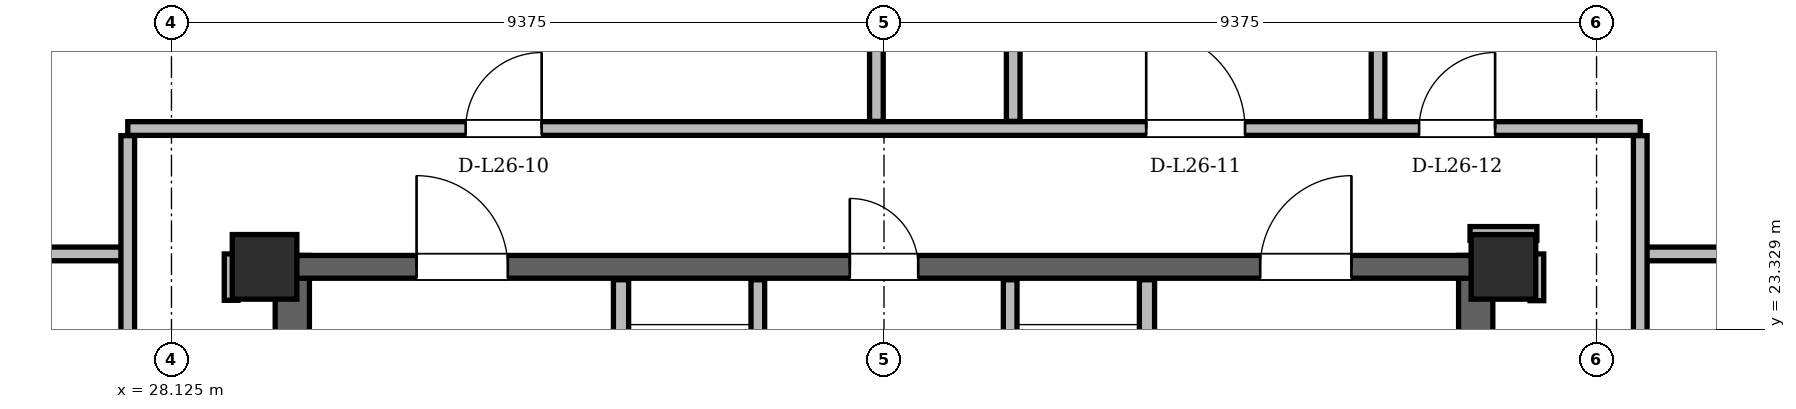
"""IFC4 building model, lengths in metres.
Left out: names, types, materials, properties, quantities, classifications, styles, units other than length and angle.
Written with IfcOpenShell. Run it as: python <this file> out.ifc"""

import sys

from ifc_helpers import new_model, si_unit, direction, frame, frame_2d, origin, origin_2d, place, context, subcontext, project, spatial, rectangle, hollow_rectangle, extrude, element, fill, save


model = new_model("IFC4")
c1 = context("Model", 3, precision=1e-05, world=origin(), true_north=direction((0.0, 1.0)))
c2 = subcontext(c1, "Body", "Model", "MODEL_VIEW")
j1 = project(units=[si_unit("LENGTHUNIT", "METRE"), si_unit("PLANEANGLEUNIT", "RADIAN")], contexts=[c1])
p1 = place(None, origin())
s1 = spatial("IfcSite", under=j1, at=p1, CompositionType="ELEMENT")
p2 = place(p1, origin())
s2 = spatial("IfcBuilding", under=s1, at=p2, CompositionType="ELEMENT")
p3 = place(p2, frame((0.0, 0.0, 100.5)))
s3 = spatial("IfcBuildingStorey", under=s2, at=p3, CompositionType="ELEMENT", Elevation=100.5)
for number, where, z_axis, x_axis in (
    (1, (45.65, 24.15, 0.0), (0.0, 0.0, 1.0), (1.0, 0.0, 0.0)),
    (2, (29.35, 24.15, 0.0), (0.0, 0.0, 1.0), (1.0, 0.0, 0.0)),
):
    element("IfcColumn", number, at=place(p3, frame(where, z_axis=z_axis, x_axis=x_axis)), inside=s3, PredefinedType="COLUMN", context=c2, shape_type="SweptSolid", body=[
        extrude(hollow_rectangle(XDim=0.85, YDim=0.85, WallThickness=0.07, at=origin_2d()), origin(), (0.0, 0.0, 1.0), 3.6),
    ])
for number, where, z_axis, x_axis in (
    (3, (29.715, 11.0, 0.0), (0.0, 0.0, 1.0), (0.0, 1.0, 0.0)),
    (4, (45.285, 11.0, 0.0), (0.0, 0.0, 1.0), (0.0, 1.0, 0.0)),
):
    element("IfcWall", number, at=place(p3, frame(where, z_axis=z_axis, x_axis=x_axis)), inside=s3, PredefinedType="SHEAR", context=c2, shape_type="SweptSolid", body=[
        extrude(rectangle(XDim=13.3, YDim=0.45, at=frame_2d((6.65, 0.0))), origin(), (0.0, 0.0, 1.0), 3.36),
    ])
p4 = place(p3, frame((29.65, 24.15, 0.0), z_axis=(0.0, 0.0, 1.0), x_axis=(1.0, 0.0, 0.0)))
e5 = element("IfcWall", 5, at=p4, inside=s3, PredefinedType="SHEAR", context=c2, shape_type="SweptSolid", body=[
    extrude(rectangle(XDim=15.7, YDim=0.3, at=frame_2d((7.85, 0.0))), origin(), (0.0, 0.0, 1.0), 3.36),
])
p5 = place(p4, frame((1.7, 0.0, 0.0)))
e6 = element("IfcOpeningElement", 6, at=p5, cuts=e5, PredefinedType="OPENING", context=c2, shape_type="SweptSolid", body=[
    extrude(rectangle(XDim=1.2, YDim=2.2, at=frame_2d((0.6, 1.1))), frame((0.0, 0.15, 0.0), z_axis=(0.0, -1.0, 0.0), x_axis=(1.0, 0.0, 0.0)), (0.0, 0.0, 1.0), 0.3),
])
p6 = place(p4, frame((12.8, 0.0, 0.0)))
e7 = element("IfcOpeningElement", 7, at=p6, cuts=e5, PredefinedType="OPENING", context=c2, shape_type="SweptSolid", body=[
    extrude(rectangle(XDim=1.2, YDim=2.2, at=frame_2d((0.6, 1.1))), frame((0.0, 0.15, 0.0), z_axis=(0.0, -1.0, 0.0), x_axis=(1.0, 0.0, 0.0)), (0.0, 0.0, 1.0), 0.3),
])
p7 = place(p4, frame((7.4, 0.0, 0.0)))
e8 = element("IfcOpeningElement", 8, at=p7, cuts=e5, PredefinedType="OPENING", context=c2, shape_type="SweptSolid", body=[
    extrude(rectangle(XDim=0.9, YDim=2.05, at=frame_2d((0.45, 1.025))), frame((0.0, 0.15, 0.0), z_axis=(0.0, -1.0, 0.0), x_axis=(1.0, 0.0, 0.0)), (0.0, 0.0, 1.0), 0.3),
])
p8 = place(p3, frame((60.69, 13.561, 0.0), z_axis=(0.0, 0.0, 1.0), x_axis=(-0.500002056916, 0.86602421622, 0.0)))
e9 = element("IfcWall", 9, at=p8, inside=s3, PredefinedType="SOLIDWALL", context=c2, shape_type="SweptSolid", body=[
    extrude(rectangle(XDim=34.516, YDim=0.34, at=frame_2d((17.258, 0.0))), origin(), (0.0, 0.0, 1.0), 2.578),
])
p9 = place(p8, frame((8.034, 0.0, 0.0)))
e10 = element("IfcOpeningElement", 10, at=p9, cuts=e9, PredefinedType="OPENING", context=c2, shape_type="SweptSolid", body=[
    extrude(rectangle(XDim=1.5, YDim=2.2, at=frame_2d((0.75, 1.1))), frame((0.0, 0.17, 0.0), z_axis=(0.0, -1.0, 0.0), x_axis=(1.0, 0.0, 0.0)), (0.0, 0.0, 1.0), 0.34),
])
p10 = place(p8, frame((26.647, 0.0, 0.0)))
e11 = element("IfcOpeningElement", 11, at=p10, cuts=e9, PredefinedType="OPENING", context=c2, shape_type="SweptSolid", body=[
    extrude(rectangle(XDim=1.5, YDim=2.2, at=frame_2d((0.75, 1.1))), frame((0.0, 0.17, 0.0), z_axis=(0.0, -1.0, 0.0), x_axis=(1.0, 0.0, 0.0)), (0.0, 0.0, 1.0), 0.34),
])
p11 = place(p8, frame((1.477, 0.0, 0.85)))
e12 = element("IfcOpeningElement", 12, at=p11, cuts=e9, PredefinedType="OPENING", context=c2, shape_type="SweptSolid", body=[
    extrude(rectangle(XDim=2.5, YDim=1.618, at=frame_2d((1.25, 0.809))), frame((0.0, 0.17, 0.0), z_axis=(0.0, -1.0, 0.0), x_axis=(1.0, 0.0, 0.0)), (0.0, 0.0, 1.0), 0.34),
])
p12 = place(p8, frame((16.107, 0.0, 0.85)))
e13 = element("IfcOpeningElement", 13, at=p12, cuts=e9, PredefinedType="OPENING", context=c2, shape_type="SweptSolid", body=[
    extrude(rectangle(XDim=1.4, YDim=1.6, at=frame_2d((0.7, 0.8))), frame((0.0, 0.17, 0.0), z_axis=(0.0, -1.0, 0.0), x_axis=(1.0, 0.0, 0.0)), (0.0, 0.0, 1.0), 0.34),
])
p13 = place(p8, frame((30.693, 0.0, 0.85)))
e14 = element("IfcOpeningElement", 14, at=p13, cuts=e9, PredefinedType="OPENING", context=c2, shape_type="SweptSolid", body=[
    extrude(rectangle(XDim=2.5, YDim=1.618, at=frame_2d((1.25, 0.809))), frame((0.0, 0.17, 0.0), z_axis=(0.0, -1.0, 0.0), x_axis=(1.0, 0.0, 0.0)), (0.0, 0.0, 1.0), 0.34),
])
p14 = place(p3, frame((31.568, 43.453, 0.0), z_axis=(0.0, 0.0, 1.0), x_axis=(-0.500002056916, -0.86602421622, 0.0)))
e15 = element("IfcWall", 15, at=p14, inside=s3, PredefinedType="SOLIDWALL", context=c2, shape_type="SweptSolid", body=[
    extrude(rectangle(XDim=34.516, YDim=0.34, at=frame_2d((17.258, 0.0))), origin(), (0.0, 0.0, 1.0), 2.578),
])
p15 = place(p14, frame((8.034, 0.0, 0.0)))
e16 = element("IfcOpeningElement", 16, at=p15, cuts=e15, PredefinedType="OPENING", context=c2, shape_type="SweptSolid", body=[
    extrude(rectangle(XDim=1.5, YDim=2.2, at=frame_2d((0.75, 1.1))), frame((0.0, 0.17, 0.0), z_axis=(0.0, -1.0, 0.0), x_axis=(1.0, 0.0, 0.0)), (0.0, 0.0, 1.0), 0.34),
])
p16 = place(p14, frame((26.647, 0.0, 0.0)))
e17 = element("IfcOpeningElement", 17, at=p16, cuts=e15, PredefinedType="OPENING", context=c2, shape_type="SweptSolid", body=[
    extrude(rectangle(XDim=1.5, YDim=2.2, at=frame_2d((0.75, 1.1))), frame((0.0, 0.17, 0.0), z_axis=(0.0, -1.0, 0.0), x_axis=(1.0, 0.0, 0.0)), (0.0, 0.0, 1.0), 0.34),
])
p17 = place(p14, frame((31.672, 0.0, 0.85)))
e18 = element("IfcOpeningElement", 18, at=p17, cuts=e15, PredefinedType="OPENING", context=c2, shape_type="SweptSolid", body=[
    extrude(rectangle(XDim=1.6, YDim=1.618, at=frame_2d((0.8, 0.809))), frame((0.0, 0.17, 0.0), z_axis=(0.0, -1.0, 0.0), x_axis=(1.0, 0.0, 0.0)), (0.0, 0.0, 1.0), 0.34),
])
p18 = place(p14, frame((11.262, 0.0, 0.85)))
e19 = element("IfcOpeningElement", 19, at=p18, cuts=e15, PredefinedType="OPENING", context=c2, shape_type="SweptSolid", body=[
    extrude(rectangle(XDim=1.8, YDim=1.618, at=frame_2d((0.9, 0.809))), frame((0.0, 0.17, 0.0), z_axis=(0.0, -1.0, 0.0), x_axis=(1.0, 0.0, 0.0)), (0.0, 0.0, 1.0), 0.34),
])
p19 = place(p14, frame((18.602, 0.0, 0.85)))
e20 = element("IfcOpeningElement", 20, at=p19, cuts=e15, PredefinedType="OPENING", context=c2, shape_type="SweptSolid", body=[
    extrude(rectangle(XDim=1.2, YDim=1.48, at=frame_2d((0.6, 0.74))), frame((0.0, 0.17, 0.0), z_axis=(0.0, -1.0, 0.0), x_axis=(1.0, 0.0, 0.0)), (0.0, 0.0, 1.0), 0.34),
])
p20 = place(p14, frame((1.763, 0.0, 0.85)))
e21 = element("IfcOpeningElement", 21, at=p20, cuts=e15, PredefinedType="OPENING", context=c2, shape_type="SweptSolid", body=[
    extrude(rectangle(XDim=1.6, YDim=1.618, at=frame_2d((0.8, 0.809))), frame((0.0, 0.17, 0.0), z_axis=(0.0, -1.0, 0.0), x_axis=(1.0, 0.0, 0.0)), (0.0, 0.0, 1.0), 0.34),
])
p21 = place(p3, frame((34.04, 19.48, 0.0), z_axis=(0.0, 0.0, 1.0), x_axis=(0.0, 1.0, 0.0)))
e22 = element("IfcWall", 22, at=p21, inside=s3, PredefinedType="PARTITIONING", context=c2, shape_type="SweptSolid", body=[
    extrude(rectangle(XDim=4.5, YDim=0.2, at=frame_2d((2.25, 0.0))), origin(), (0.0, 0.0, 1.0), 2.4),
])
p22 = place(p21, frame((2.12, 0.0, 0.0)))
e23 = element("IfcOpeningElement", 23, at=p22, cuts=e22, PredefinedType="OPENING", context=c2, shape_type="SweptSolid", body=[
    extrude(rectangle(XDim=1.1, YDim=2.2, at=frame_2d((0.55, 1.1))), frame((0.0, 0.1, 0.0), z_axis=(0.0, -1.0, 0.0), x_axis=(1.0, 0.0, 0.0)), (0.0, 0.0, 1.0), 0.2),
])
p23 = place(p3, frame((35.84, 20.96, 0.0), z_axis=(0.0, 0.0, 1.0), x_axis=(0.0, 1.0, 0.0)))
e24 = element("IfcWall", 24, at=p23, inside=s3, PredefinedType="PARTITIONING", context=c2, shape_type="SweptSolid", body=[
    extrude(rectangle(XDim=3.02, YDim=0.18, at=frame_2d((1.51, 0.0))), origin(), (0.0, 0.0, 1.0), 2.4),
])
p24 = place(p3, frame((40.96, 19.48, 0.0), z_axis=(0.0, 0.0, 1.0), x_axis=(0.0, 1.0, 0.0)))
e25 = element("IfcWall", 25, at=p24, inside=s3, PredefinedType="PARTITIONING", context=c2, shape_type="SweptSolid", body=[
    extrude(rectangle(XDim=4.5, YDim=0.2, at=frame_2d((2.25, 0.0))), origin(), (0.0, 0.0, 1.0), 2.4),
])
p25 = place(p24, frame((2.12, 0.0, 0.0)))
e26 = element("IfcOpeningElement", 26, at=p25, cuts=e25, PredefinedType="OPENING", context=c2, shape_type="SweptSolid", body=[
    extrude(rectangle(XDim=1.1, YDim=2.2, at=frame_2d((0.55, 1.1))), frame((0.0, 0.1, 0.0), z_axis=(0.0, -1.0, 0.0), x_axis=(1.0, 0.0, 0.0)), (0.0, 0.0, 1.0), 0.2),
])
p26 = place(p3, frame((39.16, 20.96, 0.0), z_axis=(0.0, 0.0, 1.0), x_axis=(0.0, 1.0, 0.0)))
e27 = element("IfcWall", 27, at=p26, inside=s3, PredefinedType="PARTITIONING", context=c2, shape_type="SweptSolid", body=[
    extrude(rectangle(XDim=3.02, YDim=0.18, at=frame_2d((1.51, 0.0))), origin(), (0.0, 0.0, 1.0), 2.4),
])
p27 = place(p3, frame((20.723, 24.32, 0.0), z_axis=(0.0, 0.0, 1.0), x_axis=(1.0, 0.0, 0.0)))
e28 = element("IfcWall", 28, at=p27, inside=s3, PredefinedType="PARTITIONING", context=c2, shape_type="SweptSolid", body=[
    extrude(rectangle(XDim=6.887, YDim=0.18, at=frame_2d((3.444, 0.0))), origin(), (0.0, 0.0, 1.0), 3.36),
])
p28 = place(p3, frame((47.45, 24.32, 0.0), z_axis=(0.0, 0.0, 1.0), x_axis=(1.0, 0.0, 0.0)))
e29 = element("IfcWall", 29, at=p28, inside=s3, PredefinedType="PARTITIONING", context=c2, shape_type="SweptSolid", body=[
    extrude(rectangle(XDim=6.827, YDim=0.18, at=frame_2d((3.414, 0.0))), origin(), (0.0, 0.0, 1.0), 3.36),
])
p29 = place(p3, frame((45.21, 24.59, 0.0), z_axis=(0.0, 0.0, 1.0), x_axis=(1.0, 0.0, 0.0)))
e30 = element("IfcWall", 30, at=p29, inside=s3, PredefinedType="PARTITIONING", context=c2, shape_type="SweptSolid", body=[
    extrude(rectangle(XDim=0.88, YDim=0.18, at=frame_2d((0.44, 0.0))), origin(), (0.0, 0.0, 1.0), 2.814),
])
p30 = place(p3, frame((27.55, 25.97, 0.0), z_axis=(0.0, 0.0, 1.0), x_axis=(1.0, 0.0, 0.0)))
e31 = element("IfcWall", 31, at=p30, inside=s3, PredefinedType="PARTITIONING", context=c2, shape_type="SweptSolid", body=[
    extrude(rectangle(XDim=19.9, YDim=0.18, at=frame_2d((9.95, 0.0))), origin(), (0.0, 0.0, 1.0), 2.814),
])
p31 = place(p30, frame((4.446, 0.0, 0.0)))
e32 = element("IfcOpeningElement", 32, at=p31, cuts=e31, PredefinedType="OPENING", context=c2, shape_type="SweptSolid", body=[
    extrude(rectangle(XDim=1.0, YDim=2.18, at=frame_2d((0.5, 1.09))), frame((0.0, 0.09, 0.0), z_axis=(0.0, -1.0, 0.0), x_axis=(1.0, 0.0, 0.0)), (0.0, 0.0, 1.0), 0.18),
])
p32 = place(p30, frame((13.4, 0.0, 0.0)))
e33 = element("IfcOpeningElement", 33, at=p32, cuts=e31, PredefinedType="OPENING", context=c2, shape_type="SweptSolid", body=[
    extrude(rectangle(XDim=1.3, YDim=2.2, at=frame_2d((0.65, 1.1))), frame((0.0, 0.09, 0.0), z_axis=(0.0, -1.0, 0.0), x_axis=(1.0, 0.0, 0.0)), (0.0, 0.0, 1.0), 0.18),
])
p33 = place(p30, frame((16.99, 0.0, 0.0)))
e34 = element("IfcOpeningElement", 34, at=p33, cuts=e31, PredefinedType="OPENING", context=c2, shape_type="SweptSolid", body=[
    extrude(rectangle(XDim=1.0, YDim=2.18, at=frame_2d((0.5, 1.09))), frame((0.0, 0.09, 0.0), z_axis=(0.0, -1.0, 0.0), x_axis=(1.0, 0.0, 0.0)), (0.0, 0.0, 1.0), 0.18),
])
p34 = place(p3, frame((27.55, 11.044, 0.0), z_axis=(0.0, 0.0, 1.0), x_axis=(0.0, 1.0, 0.0)))
e35 = element("IfcWall", 35, at=p34, inside=s3, PredefinedType="PARTITIONING", context=c2, shape_type="SweptSolid", body=[
    extrude(rectangle(XDim=14.832, YDim=0.18, at=frame_2d((7.416, 0.0))), origin(), (0.0, 0.0, 1.0), 2.814),
])
p35 = place(p34, frame((9.795, 0.0, 0.0)))
e36 = element("IfcOpeningElement", 36, at=p35, cuts=e35, PredefinedType="OPENING", context=c2, shape_type="SweptSolid", body=[
    extrude(rectangle(XDim=1.0, YDim=2.18, at=frame_2d((0.5, 1.09))), frame((0.0, 0.09, 0.0), z_axis=(0.0, -1.0, 0.0), x_axis=(1.0, 0.0, 0.0)), (0.0, 0.0, 1.0), 0.18),
])
p36 = place(p3, frame((28.91, 23.71, 0.0), z_axis=(0.0, 0.0, 1.0), x_axis=(0.0, 1.0, 0.0)))
e37 = element("IfcWall", 37, at=p36, inside=s3, PredefinedType="PARTITIONING", context=c2, shape_type="SweptSolid", body=[
    extrude(rectangle(XDim=0.61, YDim=0.18, at=frame_2d((0.305, 0.0))), origin(), (0.0, 0.0, 1.0), 3.36),
])
p37 = place(p3, frame((37.4, 26.064, 0.0), z_axis=(0.0, 0.0, 1.0), x_axis=(0.0, 1.0, 0.0)))
e38 = element("IfcWall", 38, at=p37, inside=s3, PredefinedType="PARTITIONING", context=c2, shape_type="SweptSolid", body=[
    extrude(rectangle(XDim=17.215, YDim=0.18, at=frame_2d((8.607, 0.0))), origin(), (0.0, 0.0, 1.0), 3.36),
])
p38 = place(p3, frame((39.2, 26.064, 0.0), z_axis=(0.0, 0.0, 1.0), x_axis=(0.0, 1.0, 0.0)))
e39 = element("IfcWall", 39, at=p38, inside=s3, PredefinedType="PARTITIONING", context=c2, shape_type="SweptSolid", body=[
    extrude(rectangle(XDim=4.312, YDim=0.18, at=frame_2d((2.156, 0.0))), origin(), (0.0, 0.0, 1.0), 3.36),
])
p39 = place(p3, frame((44.0, 26.064, 0.0), z_axis=(0.0, 0.0, 1.0), x_axis=(0.0, 1.0, 0.0)))
e40 = element("IfcWall", 40, at=p39, inside=s3, PredefinedType="PARTITIONING", context=c2, shape_type="SweptSolid", body=[
    extrude(rectangle(XDim=4.312, YDim=0.18, at=frame_2d((2.156, 0.0))), origin(), (0.0, 0.0, 1.0), 2.946),
])
p40 = place(p3, frame((46.09, 23.705, 0.0), z_axis=(0.0, 0.0, 1.0), x_axis=(0.0, 1.0, 0.0)))
e41 = element("IfcWall", 41, at=p40, inside=s3, PredefinedType="PARTITIONING", context=c2, shape_type="SweptSolid", body=[
    extrude(rectangle(XDim=0.615, YDim=0.18, at=frame_2d((0.308, 0.0))), origin(), (0.0, 0.0, 1.0), 2.946),
])
p41 = place(p3, frame((47.45, 11.044, 0.0), z_axis=(0.0, 0.0, 1.0), x_axis=(0.0, 1.0, 0.0)))
e42 = element("IfcWall", 42, at=p41, inside=s3, PredefinedType="PARTITIONING", context=c2, shape_type="SweptSolid", body=[
    extrude(rectangle(XDim=14.832, YDim=0.18, at=frame_2d((7.416, 0.0))), origin(), (0.0, 0.0, 1.0), 2.814),
])
p42 = place(p5, origin())
e43 = element("IfcDoor", 43, at=p42, inside=s3, OperationType="SINGLE_SWING_LEFT", PredefinedType="DOOR", context=c2, shape_type="SweptSolid", body=[
    extrude(rectangle(XDim=1.2, YDim=2.2, at=frame_2d((0.6, 1.1))), frame((0.0, 0.025, 0.0), z_axis=(0.0, -1.0, 0.0), x_axis=(1.0, 0.0, 0.0)), (0.0, 0.0, 1.0), 0.05),
])
fill(e6, e43)
p43 = place(p6, origin())
e44 = element("IfcDoor", 44, at=p43, inside=s3, OperationType="SINGLE_SWING_RIGHT", PredefinedType="DOOR", context=c2, shape_type="SweptSolid", body=[
    extrude(rectangle(XDim=1.2, YDim=2.2, at=frame_2d((0.6, 1.1))), frame((0.0, 0.025, 0.0), z_axis=(0.0, -1.0, 0.0), x_axis=(1.0, 0.0, 0.0)), (0.0, 0.0, 1.0), 0.05),
])
fill(e7, e44)
p44 = place(p7, origin())
e45 = element("IfcDoor", 45, at=p44, inside=s3, OperationType="SINGLE_SWING_LEFT", PredefinedType="DOOR", context=c2, shape_type="SweptSolid", body=[
    extrude(rectangle(XDim=0.9, YDim=2.05, at=frame_2d((0.45, 1.025))), frame((0.0, 0.025, 0.0), z_axis=(0.0, -1.0, 0.0), x_axis=(1.0, 0.0, 0.0)), (0.0, 0.0, 1.0), 0.05),
])
fill(e8, e45)
p45 = place(p31, origin())
e46 = element("IfcDoor", 46, at=p45, inside=s3, OperationType="SINGLE_SWING_RIGHT", PredefinedType="DOOR", context=c2, shape_type="SweptSolid", body=[
    extrude(rectangle(XDim=1.0, YDim=2.18, at=frame_2d((0.5, 1.09))), frame((0.0, 0.025, 0.0), z_axis=(0.0, -1.0, 0.0), x_axis=(1.0, 0.0, 0.0)), (0.0, 0.0, 1.0), 0.05),
])
fill(e32, e46)
p46 = place(p32, origin())
e47 = element("IfcDoor", 47, at=p46, inside=s3, OperationType="SINGLE_SWING_LEFT", PredefinedType="DOOR", context=c2, shape_type="SweptSolid", body=[
    extrude(rectangle(XDim=1.3, YDim=2.2, at=frame_2d((0.65, 1.1))), frame((0.0, 0.025, 0.0), z_axis=(0.0, -1.0, 0.0), x_axis=(1.0, 0.0, 0.0)), (0.0, 0.0, 1.0), 0.05),
])
fill(e33, e47)
p47 = place(p33, origin())
e48 = element("IfcDoor", 48, at=p47, inside=s3, OperationType="SINGLE_SWING_RIGHT", PredefinedType="DOOR", context=c2, shape_type="SweptSolid", body=[
    extrude(rectangle(XDim=1.0, YDim=2.18, at=frame_2d((0.5, 1.09))), frame((0.0, 0.025, 0.0), z_axis=(0.0, -1.0, 0.0), x_axis=(1.0, 0.0, 0.0)), (0.0, 0.0, 1.0), 0.05),
])
fill(e34, e48)
save(model, sys.argv[1])
